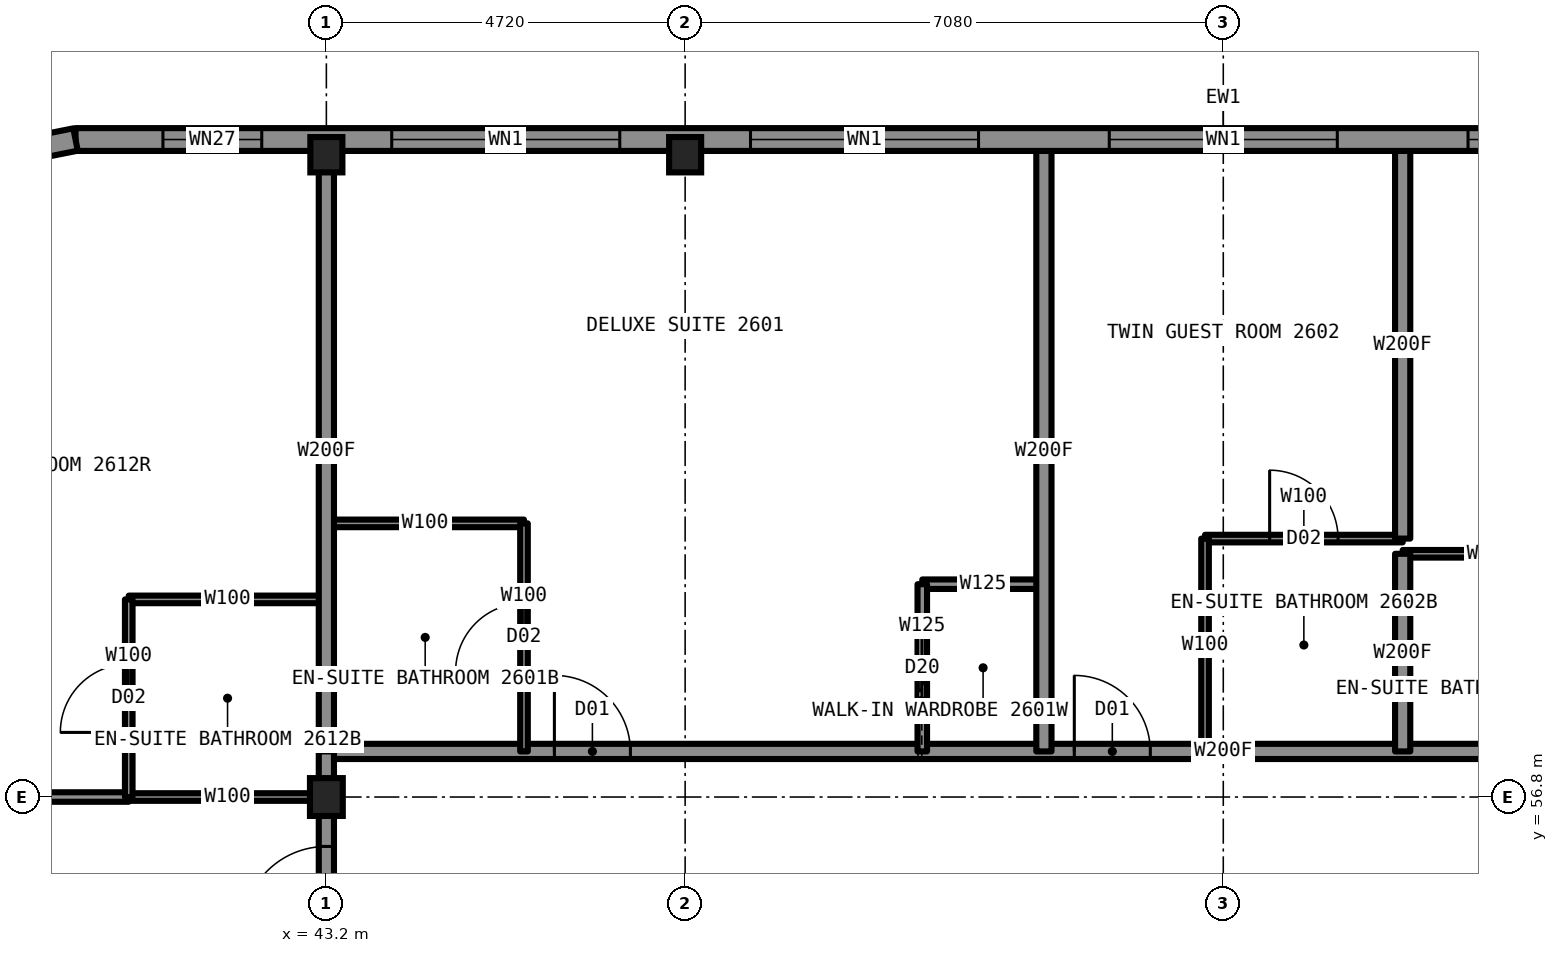
"""IFC4 building model, lengths in metres.
Left out: names, types, materials, properties, quantities, classifications, styles, units other than length and angle.
Written with IfcOpenShell. Run it as: python <this file> out.ifc"""

import sys

from ifc_helpers import new_model, si_unit, direction, frame, frame_2d, origin, origin_2d, place, context, subcontext, project, spatial, rectangle, i_section, extrude, element, fill, save


model = new_model("IFC4")
c1 = context("Model", 3, precision=1e-05, world=origin(), true_north=direction((0.0, 1.0)))
c2 = subcontext(c1, "Body", "Model", "MODEL_VIEW")
j1 = project(units=[si_unit("LENGTHUNIT", "METRE"), si_unit("PLANEANGLEUNIT", "RADIAN")], contexts=[c1])
p1 = place(None, origin())
s1 = spatial("IfcSite", under=j1, at=p1, CompositionType="ELEMENT")
p2 = place(p1, origin())
s2 = spatial("IfcBuilding", under=s1, at=p2, CompositionType="ELEMENT")
p3 = place(p2, frame((0.0, 0.0, 93.4)))
s3 = spatial("IfcBuildingStorey", under=s2, at=p3, CompositionType="ELEMENT", Elevation=93.4)
for number, where, z_axis, x_axis in (
    (1, (43.2, 65.25, 0.0), (0.0, 0.0, 1.0), (1.0, 0.0, 0.0)),
    (2, (47.92, 65.25, 0.0), (0.0, 0.0, 1.0), (1.0, 0.0, 0.0)),
):
    element("IfcColumn", number, at=place(p3, frame(where, z_axis=z_axis, x_axis=x_axis)), inside=s3, PredefinedType="COLUMN", context=c2, shape_type="SweptSolid", body=[
        extrude(i_section(OverallWidth=0.442, OverallDepth=0.531, WebThickness=0.066, FlangeThickness=0.106, at=origin_2d()), origin(), (0.0, 0.0, 1.0), 3.5),
    ])
p4 = place(p3, frame((43.2, 56.8, 0.0), z_axis=(0.0, 0.0, 1.0), x_axis=(1.0, 0.0, 0.0)))
e3 = element("IfcColumn", 3, at=p4, inside=s3, PredefinedType="COLUMN", context=c2, shape_type="SweptSolid", body=[
    extrude(i_section(OverallWidth=0.432, OverallDepth=0.498, WebThickness=0.056, FlangeThickness=0.089, at=origin_2d()), origin(), (0.0, 0.0, 1.0), 3.5),
])
p5 = place(p3, frame((40.6, 56.8, 0.0), z_axis=(0.0, 0.0, 1.0), x_axis=(1.0, 0.0, 0.0)))
e4 = element("IfcWall", 4, at=p5, inside=s3, PredefinedType="PARTITIONING", context=c2, shape_type="SweptSolid", body=[
    extrude(rectangle(XDim=2.6, YDim=0.1, at=frame_2d((1.3, 0.0))), origin(), (0.0, 0.0, 1.0), 2.573),
])
p6 = place(p3, frame((34.7, 56.8, 0.0), z_axis=(0.0, 0.0, 1.0), x_axis=(1.0, 0.0, 0.0)))
e5 = element("IfcWall", 5, at=p6, inside=s3, PredefinedType="PARTITIONING", context=c2, shape_type="SweptSolid", body=[
    extrude(rectangle(XDim=5.9, YDim=0.125, at=frame_2d((2.95, 0.0))), origin(), (0.0, 0.0, 1.0), 2.573),
])
p7 = place(p6, frame((3.85, 0.0, 0.0)))
e6 = element("IfcOpeningElement", 6, at=p7, cuts=e5, PredefinedType="OPENING", context=c2, shape_type="SweptSolid", body=[
    extrude(rectangle(XDim=0.9, YDim=2.2, at=frame_2d((0.45, 1.1))), frame((0.0, 0.073, 0.0), z_axis=(0.0, -1.0, 0.0), x_axis=(1.0, 0.0, 0.0)), (0.0, 0.0, 1.0), 0.145),
])
p8 = place(p3, frame((43.2, 57.4, 0.0), z_axis=(0.0, 0.0, 1.0), x_axis=(1.0, 0.0, 0.0)))
e7 = element("IfcWall", 7, at=p8, inside=s3, PredefinedType="PARTITIONING", context=c2, shape_type="SweptSolid", body=[
    extrude(rectangle(XDim=23.6, YDim=0.2, at=frame_2d((11.8, 0.0))), origin(), (0.0, 0.0, 1.0), 3.33),
])
p9 = place(p8, frame((3.0, 0.0, 0.0)))
e8 = element("IfcOpeningElement", 8, at=p9, cuts=e7, PredefinedType="OPENING", context=c2, shape_type="SweptSolid", body=[
    extrude(rectangle(XDim=1.0, YDim=2.2, at=frame_2d((0.5, 1.1))), frame((0.0, 0.11, 0.0), z_axis=(0.0, -1.0, 0.0), x_axis=(1.0, 0.0, 0.0)), (0.0, 0.0, 1.0), 0.22),
])
p10 = place(p8, frame((9.84, 0.0, 0.0)))
e9 = element("IfcOpeningElement", 9, at=p10, cuts=e7, PredefinedType="OPENING", context=c2, shape_type="SweptSolid", body=[
    extrude(rectangle(XDim=1.0, YDim=2.2, at=frame_2d((0.5, 1.1))), frame((0.0, 0.11, 0.0), z_axis=(0.0, -1.0, 0.0), x_axis=(1.0, 0.0, 0.0)), (0.0, 0.0, 1.0), 0.22),
])
p11 = place(p8, frame((16.71, 0.0, 0.0)))
e10 = element("IfcOpeningElement", 10, at=p11, cuts=e7, PredefinedType="OPENING", context=c2, shape_type="SweptSolid", body=[
    extrude(rectangle(XDim=1.0, YDim=2.2, at=frame_2d((0.5, 1.1))), frame((0.0, 0.11, 0.0), z_axis=(0.0, -1.0, 0.0), x_axis=(1.0, 0.0, 0.0)), (0.0, 0.0, 1.0), 0.22),
])
p12 = place(p8, frame((19.28, 0.0, 0.0)))
e11 = element("IfcOpeningElement", 11, at=p12, cuts=e7, PredefinedType="OPENING", context=c2, shape_type="SweptSolid", body=[
    extrude(rectangle(XDim=1.0, YDim=2.2, at=frame_2d((0.5, 1.1))), frame((0.0, 0.11, 0.0), z_axis=(0.0, -1.0, 0.0), x_axis=(1.0, 0.0, 0.0)), (0.0, 0.0, 1.0), 0.22),
])
p13 = place(p3, frame((40.6, 59.4, 0.0), z_axis=(0.0, 0.0, 1.0), x_axis=(1.0, 0.0, 0.0)))
e12 = element("IfcWall", 12, at=p13, inside=s3, PredefinedType="PARTITIONING", context=c2, shape_type="SweptSolid", body=[
    extrude(rectangle(XDim=2.6, YDim=0.1, at=frame_2d((1.3, 0.0))), origin(), (0.0, 0.0, 1.0), 3.33),
])
p14 = place(p3, frame((51.04, 59.6, 0.0), z_axis=(0.0, 0.0, 1.0), x_axis=(1.0, 0.0, 0.0)))
e13 = element("IfcWall", 13, at=p14, inside=s3, PredefinedType="PARTITIONING", context=c2, shape_type="SweptSolid", body=[
    extrude(rectangle(XDim=1.6, YDim=0.125, at=frame_2d((0.8, 0.0))), origin(), (0.0, 0.0, 1.0), 3.33),
])
p15 = place(p3, frame((57.36, 60.0, 0.0), z_axis=(0.0, 0.0, 1.0), x_axis=(1.0, 0.0, 0.0)))
e14 = element("IfcWall", 14, at=p15, inside=s3, PredefinedType="PARTITIONING", context=c2, shape_type="SweptSolid", body=[
    extrude(rectangle(XDim=2.3, YDim=0.1, at=frame_2d((1.15, 0.0))), origin(), (0.0, 0.0, 1.0), 2.731),
])
p16 = place(p3, frame((54.76, 60.2, 0.0), z_axis=(0.0, 0.0, 1.0), x_axis=(1.0, 0.0, 0.0)))
e15 = element("IfcWall", 15, at=p16, inside=s3, PredefinedType="PARTITIONING", context=c2, shape_type="SweptSolid", body=[
    extrude(rectangle(XDim=2.6, YDim=0.1, at=frame_2d((1.3, 0.0))), origin(), (0.0, 0.0, 1.0), 2.731),
])
p17 = place(p16, frame((0.85, 0.0, 0.0)))
e16 = element("IfcOpeningElement", 16, at=p17, cuts=e15, PredefinedType="OPENING", context=c2, shape_type="SweptSolid", body=[
    extrude(rectangle(XDim=0.9, YDim=2.1, at=frame_2d((0.45, 1.05))), frame((0.0, 0.06, 0.0), z_axis=(0.0, -1.0, 0.0), x_axis=(1.0, 0.0, 0.0)), (0.0, 0.0, 1.0), 0.12),
])
p18 = place(p3, frame((43.2, 60.4, 0.0), z_axis=(0.0, 0.0, 1.0), x_axis=(1.0, 0.0, 0.0)))
e17 = element("IfcWall", 17, at=p18, inside=s3, PredefinedType="PARTITIONING", context=c2, shape_type="SweptSolid", body=[
    extrude(rectangle(XDim=2.6, YDim=0.1, at=frame_2d((1.3, 0.0))), origin(), (0.0, 0.0, 1.0), 3.33),
])
p19 = place(p3, frame((54.76, 57.4, 0.0), z_axis=(0.0, 0.0, 1.0), x_axis=(0.0, 1.0, 0.0)))
e18 = element("IfcWall", 18, at=p19, inside=s3, PredefinedType="PARTITIONING", context=c2, shape_type="SweptSolid", body=[
    extrude(rectangle(XDim=2.8, YDim=0.1, at=frame_2d((1.4, 0.0))), origin(), (0.0, 0.0, 1.0), 3.33),
])
p20 = place(p3, frame((43.2, 33.22, 0.0), z_axis=(0.0, 0.0, 1.0), x_axis=(0.0, 1.0, 0.0)))
e19 = element("IfcWall", 19, at=p20, inside=s3, PredefinedType="PARTITIONING", context=c2, shape_type="SweptSolid", body=[
    extrude(rectangle(XDim=23.56, YDim=0.2, at=frame_2d((11.78, 0.0))), origin(), (0.0, 0.0, 1.0), 3.33),
])
p21 = place(p20, frame((16.4, 0.0, 0.0)))
e20 = element("IfcOpeningElement", 20, at=p21, cuts=e19, PredefinedType="OPENING", context=c2, shape_type="SweptSolid", body=[
    extrude(rectangle(XDim=1.0, YDim=2.2, at=frame_2d((0.5, 1.1))), frame((0.0, 0.11, 0.0), z_axis=(0.0, -1.0, 0.0), x_axis=(1.0, 0.0, 0.0)), (0.0, 0.0, 1.0), 0.22),
])
p22 = place(p20, frame((21.83, 0.0, 0.0)))
e21 = element("IfcOpeningElement", 21, at=p22, cuts=e19, PredefinedType="OPENING", context=c2, shape_type="SweptSolid", body=[
    extrude(rectangle(XDim=1.1, YDim=2.2, at=frame_2d((0.55, 1.1))), frame((0.0, 0.11, 0.0), z_axis=(0.0, -1.0, 0.0), x_axis=(1.0, 0.0, 0.0)), (0.0, 0.0, 1.0), 0.22),
])
p23 = place(p20, frame((0.63, 0.0, 0.0)))
e22 = element("IfcOpeningElement", 22, at=p23, cuts=e19, PredefinedType="OPENING", context=c2, shape_type="SweptSolid", body=[
    extrude(rectangle(XDim=1.1, YDim=2.2, at=frame_2d((0.55, 1.1))), frame((0.0, 0.11, 0.0), z_axis=(0.0, -1.0, 0.0), x_axis=(1.0, 0.0, 0.0)), (0.0, 0.0, 1.0), 0.22),
])
p24 = place(p20, frame((7.45, 0.0, 0.0)))
e23 = element("IfcOpeningElement", 23, at=p24, cuts=e19, PredefinedType="OPENING", context=c2, shape_type="SweptSolid", body=[
    extrude(rectangle(XDim=2.0, YDim=2.4, at=frame_2d((1.0, 1.2))), frame((0.0, 0.11, 0.0), z_axis=(0.0, -1.0, 0.0), x_axis=(1.0, 0.0, 0.0)), (0.0, 0.0, 1.0), 0.22),
])
p25 = place(p20, frame((5.4, 0.0, 0.0)))
e24 = element("IfcOpeningElement", 24, at=p25, cuts=e19, PredefinedType="OPENING", context=c2, shape_type="SweptSolid", body=[
    extrude(rectangle(XDim=1.0, YDim=2.1, at=frame_2d((0.5, 1.05))), frame((0.0, 0.11, 0.0), z_axis=(0.0, -1.0, 0.0), x_axis=(1.0, 0.0, 0.0)), (0.0, 0.0, 1.0), 0.22),
])
p26 = place(p3, frame((43.2, 57.4, 0.0), z_axis=(0.0, 0.0, 1.0), x_axis=(0.0, 1.0, 0.0)))
e25 = element("IfcWall", 25, at=p26, inside=s3, PredefinedType="PARTITIONING", context=c2, shape_type="SweptSolid", body=[
    extrude(rectangle(XDim=7.9, YDim=0.2, at=frame_2d((3.95, 0.0))), origin(), (0.0, 0.0, 1.0), 2.573),
])
p27 = place(p3, frame((40.6, 56.8, 0.0), z_axis=(0.0, 0.0, 1.0), x_axis=(0.0, 1.0, 0.0)))
e26 = element("IfcWall", 26, at=p27, inside=s3, PredefinedType="PARTITIONING", context=c2, shape_type="SweptSolid", body=[
    extrude(rectangle(XDim=2.6, YDim=0.1, at=frame_2d((1.3, 0.0))), origin(), (0.0, 0.0, 1.0), 3.33),
])
p28 = place(p27, frame((0.85, 0.0, 0.0)))
e27 = element("IfcOpeningElement", 27, at=p28, cuts=e26, PredefinedType="OPENING", context=c2, shape_type="SweptSolid", body=[
    extrude(rectangle(XDim=0.9, YDim=2.1, at=frame_2d((0.45, 1.05))), frame((0.0, 0.06, 0.0), z_axis=(0.0, -1.0, 0.0), x_axis=(1.0, 0.0, 0.0)), (0.0, 0.0, 1.0), 0.12),
])
p29 = place(p3, frame((52.64, 57.4, 0.0), z_axis=(0.0, 0.0, 1.0), x_axis=(0.0, 1.0, 0.0)))
e28 = element("IfcWall", 28, at=p29, inside=s3, PredefinedType="PARTITIONING", context=c2, shape_type="SweptSolid", body=[
    extrude(rectangle(XDim=7.9, YDim=0.2, at=frame_2d((3.95, 0.0))), origin(), (0.0, 0.0, 1.0), 3.33),
])
p30 = place(p3, frame((51.04, 57.4, 0.0), z_axis=(0.0, 0.0, 1.0), x_axis=(0.0, 1.0, 0.0)))
e29 = element("IfcWall", 29, at=p30, inside=s3, PredefinedType="PARTITIONING", context=c2, shape_type="SweptSolid", body=[
    extrude(rectangle(XDim=2.2, YDim=0.125, at=frame_2d((1.1, 0.0))), origin(), (0.0, 0.0, 1.0), 3.33),
])
p31 = place(p30, frame((0.7, 0.0, 0.0)))
e30 = element("IfcOpeningElement", 30, at=p31, cuts=e29, PredefinedType="OPENING", context=c2, shape_type="SweptSolid", body=[
    extrude(rectangle(XDim=0.8, YDim=2.1, at=frame_2d((0.4, 1.05))), frame((0.0, 0.073, 0.0), z_axis=(0.0, -1.0, 0.0), x_axis=(1.0, 0.0, 0.0)), (0.0, 0.0, 1.0), 0.145),
])
p32 = place(p3, frame((45.8, 57.4, 0.0), z_axis=(0.0, 0.0, 1.0), x_axis=(0.0, 1.0, 0.0)))
e31 = element("IfcWall", 31, at=p32, inside=s3, PredefinedType="PARTITIONING", context=c2, shape_type="SweptSolid", body=[
    extrude(rectangle(XDim=3.0, YDim=0.1, at=frame_2d((1.5, 0.0))), origin(), (0.0, 0.0, 1.0), 3.33),
])
p33 = place(p32, frame((1.05, 0.0, 0.0)))
e32 = element("IfcOpeningElement", 32, at=p33, cuts=e31, PredefinedType="OPENING", context=c2, shape_type="SweptSolid", body=[
    extrude(rectangle(XDim=0.9, YDim=2.1, at=frame_2d((0.45, 1.05))), frame((0.0, 0.06, 0.0), z_axis=(0.0, -1.0, 0.0), x_axis=(1.0, 0.0, 0.0)), (0.0, 0.0, 1.0), 0.12),
])
p34 = place(p3, frame((57.36, 57.4, 0.0), z_axis=(0.0, 0.0, 1.0), x_axis=(0.0, 1.0, 0.0)))
e33 = element("IfcWall", 33, at=p34, inside=s3, PredefinedType="PARTITIONING", context=c2, shape_type="SweptSolid", body=[
    extrude(rectangle(XDim=2.6, YDim=0.2, at=frame_2d((1.3, 0.0))), origin(), (0.0, 0.0, 1.0), 3.33),
])
p35 = place(p3, frame((57.36, 60.2, 0.0), z_axis=(0.0, 0.0, 1.0), x_axis=(0.0, 1.0, 0.0)))
e34 = element("IfcWall", 34, at=p35, inside=s3, PredefinedType="PARTITIONING", context=c2, shape_type="SweptSolid", body=[
    extrude(rectangle(XDim=5.1, YDim=0.2, at=frame_2d((2.55, 0.0))), origin(), (0.0, 0.0, 1.0), 3.33),
])
p36 = place(p3, frame((70.1, 65.45, 0.0), z_axis=(0.0, 0.0, 1.0), x_axis=(-1.0, 0.0, 0.0)))
e35 = element("IfcWall", 35, at=p36, inside=s3, PredefinedType="SOLIDWALL", context=c2, shape_type="SweptSolid", body=[
    extrude(rectangle(XDim=30.2, YDim=0.3, at=frame_2d((15.1, 0.0))), origin(), (0.0, 0.0, 1.0), 2.83),
])
p37 = place(p36, frame((0.85, 0.0, 0.5)))
e36 = element("IfcOpeningElement", 36, at=p37, cuts=e35, PredefinedType="OPENING", context=c2, shape_type="SweptSolid", body=[
    extrude(rectangle(XDim=1.6, YDim=2.0, at=frame_2d((0.8, 1.0))), frame((0.0, 0.16, 0.0), z_axis=(0.0, -1.0, 0.0), x_axis=(1.0, 0.0, 0.0)), (0.0, 0.0, 1.0), 0.32),
])
p38 = place(p36, frame((4.16, 0.0, 0.5)))
e37 = element("IfcOpeningElement", 37, at=p38, cuts=e35, PredefinedType="OPENING", context=c2, shape_type="SweptSolid", body=[
    extrude(rectangle(XDim=3.0, YDim=2.0, at=frame_2d((1.5, 1.0))), frame((0.0, 0.16, 0.0), z_axis=(0.0, -1.0, 0.0), x_axis=(1.0, 0.0, 0.0)), (0.0, 0.0, 1.0), 0.32),
])
p39 = place(p36, frame((8.88, 0.0, 0.5)))
e38 = element("IfcOpeningElement", 38, at=p39, cuts=e35, PredefinedType="OPENING", context=c2, shape_type="SweptSolid", body=[
    extrude(rectangle(XDim=3.0, YDim=2.0, at=frame_2d((1.5, 1.0))), frame((0.0, 0.16, 0.0), z_axis=(0.0, -1.0, 0.0), x_axis=(1.0, 0.0, 0.0)), (0.0, 0.0, 1.0), 0.32),
])
p40 = place(p36, frame((13.6, 0.0, 0.5)))
e39 = element("IfcOpeningElement", 39, at=p40, cuts=e35, PredefinedType="OPENING", context=c2, shape_type="SweptSolid", body=[
    extrude(rectangle(XDim=3.0, YDim=2.0, at=frame_2d((1.5, 1.0))), frame((0.0, 0.16, 0.0), z_axis=(0.0, -1.0, 0.0), x_axis=(1.0, 0.0, 0.0)), (0.0, 0.0, 1.0), 0.32),
])
p41 = place(p36, frame((18.32, 0.0, 0.5)))
e40 = element("IfcOpeningElement", 40, at=p41, cuts=e35, PredefinedType="OPENING", context=c2, shape_type="SweptSolid", body=[
    extrude(rectangle(XDim=3.0, YDim=2.0, at=frame_2d((1.5, 1.0))), frame((0.0, 0.16, 0.0), z_axis=(0.0, -1.0, 0.0), x_axis=(1.0, 0.0, 0.0)), (0.0, 0.0, 1.0), 0.32),
])
p42 = place(p36, frame((23.04, 0.0, 0.5)))
e41 = element("IfcOpeningElement", 41, at=p42, cuts=e35, PredefinedType="OPENING", context=c2, shape_type="SweptSolid", body=[
    extrude(rectangle(XDim=3.0, YDim=2.0, at=frame_2d((1.5, 1.0))), frame((0.0, 0.16, 0.0), z_axis=(0.0, -1.0, 0.0), x_axis=(1.0, 0.0, 0.0)), (0.0, 0.0, 1.0), 0.32),
])
p43 = place(p36, frame((27.75, 0.0, 0.5)))
e42 = element("IfcOpeningElement", 42, at=p43, cuts=e35, PredefinedType="OPENING", context=c2, shape_type="SweptSolid", body=[
    extrude(rectangle(XDim=1.6, YDim=2.0, at=frame_2d((0.8, 1.0))), frame((0.0, 0.16, 0.0), z_axis=(0.0, -1.0, 0.0), x_axis=(1.0, 0.0, 0.0)), (0.0, 0.0, 1.0), 0.32),
])
p44 = place(p3, frame((39.9, 65.45, 0.0), z_axis=(0.0, 0.0, 1.0), x_axis=(-0.980787050784, -0.195081421501, 0.0)))
e43 = element("IfcWall", 43, at=p44, inside=s3, PredefinedType="SOLIDWALL", context=c2, shape_type="SweptSolid", body=[
    extrude(rectangle(XDim=2.087, YDim=0.3, at=frame_2d((1.044, 0.0))), origin(), (0.0, 0.0, 1.0), 3.33),
])
p45 = place(p44, frame((0.444, 0.0, 0.5)))
e44 = element("IfcOpeningElement", 44, at=p45, cuts=e43, PredefinedType="OPENING", context=c2, shape_type="SweptSolid", body=[
    extrude(rectangle(XDim=1.2, YDim=2.0, at=frame_2d((0.6, 1.0))), frame((0.0, 0.16, 0.0), z_axis=(0.0, -1.0, 0.0), x_axis=(1.0, 0.0, 0.0)), (0.0, 0.0, 1.0), 0.32),
])
p46 = place(p3, frame((43.2, 56.78, 0.0), z_axis=(0.0, 0.0, 1.0), x_axis=(0.0, 1.0, 0.0)))
e45 = element("IfcWall", 45, at=p46, inside=s3, PredefinedType="PARTITIONING", context=c2, shape_type="SweptSolid", body=[
    extrude(rectangle(XDim=0.62, YDim=0.2, at=frame_2d((0.31, 0.0))), origin(), (0.0, 0.0, 1.0), 2.573),
])
p47 = place(p9, origin())
e46 = element("IfcDoor", 46, at=p47, inside=s3, OperationType="SINGLE_SWING_LEFT", PredefinedType="DOOR", context=c2, shape_type="SweptSolid", body=[
    extrude(rectangle(XDim=1.0, YDim=2.2, at=frame_2d((0.5, 1.1))), frame((0.0, 0.025, 0.0), z_axis=(0.0, -1.0, 0.0), x_axis=(1.0, 0.0, 0.0)), (0.0, 0.0, 1.0), 0.05),
])
fill(e8, e46)
p48 = place(p33, origin())
e47 = element("IfcDoor", 47, at=p48, inside=s3, OperationType="SINGLE_SWING_RIGHT", PredefinedType="DOOR", context=c2, shape_type="SweptSolid", body=[
    extrude(rectangle(XDim=0.9, YDim=2.1, at=frame_2d((0.45, 1.05))), frame((0.0, 0.025, 0.0), z_axis=(0.0, -1.0, 0.0), x_axis=(1.0, 0.0, 0.0)), (0.0, 0.0, 1.0), 0.05),
])
fill(e32, e47)
p49 = place(p31, origin())
e48 = element("IfcDoor", 48, at=p49, inside=s3, OperationType="SLIDING_TO_LEFT", PredefinedType="DOOR", context=c2, shape_type="SweptSolid", body=[
    extrude(rectangle(XDim=0.8, YDim=2.1, at=frame_2d((0.4, 1.05))), frame((0.0, 0.025, 0.0), z_axis=(0.0, -1.0, 0.0), x_axis=(1.0, 0.0, 0.0)), (0.0, 0.0, 1.0), 0.05),
])
fill(e30, e48)
p50 = place(p10, origin())
e49 = element("IfcDoor", 49, at=p50, inside=s3, OperationType="SINGLE_SWING_LEFT", PredefinedType="DOOR", context=c2, shape_type="SweptSolid", body=[
    extrude(rectangle(XDim=1.0, YDim=2.2, at=frame_2d((0.5, 1.1))), frame((0.0, 0.025, 0.0), z_axis=(0.0, -1.0, 0.0), x_axis=(1.0, 0.0, 0.0)), (0.0, 0.0, 1.0), 0.05),
])
fill(e9, e49)
p51 = place(p17, origin())
e50 = element("IfcDoor", 50, at=p51, inside=s3, OperationType="SINGLE_SWING_RIGHT", PredefinedType="DOOR", context=c2, shape_type="SweptSolid", body=[
    extrude(rectangle(XDim=0.9, YDim=2.1, at=frame_2d((0.45, 1.05))), frame((0.0, 0.025, 0.0), z_axis=(0.0, -1.0, 0.0), x_axis=(1.0, 0.0, 0.0)), (0.0, 0.0, 1.0), 0.05),
])
fill(e16, e50)
p52 = place(p22, origin())
e51 = element("IfcDoor", 51, at=p52, inside=s3, OperationType="SINGLE_SWING_LEFT", PredefinedType="DOOR", context=c2, shape_type="SweptSolid", body=[
    extrude(rectangle(XDim=1.1, YDim=2.2, at=frame_2d((0.55, 1.1))), frame((0.0, 0.025, 0.0), z_axis=(0.0, -1.0, 0.0), x_axis=(1.0, 0.0, 0.0)), (0.0, 0.0, 1.0), 0.05),
])
fill(e21, e51)
p53 = place(p28, origin())
e52 = element("IfcDoor", 52, at=p53, inside=s3, OperationType="SINGLE_SWING_RIGHT", PredefinedType="DOOR", context=c2, shape_type="SweptSolid", body=[
    extrude(rectangle(XDim=0.9, YDim=2.1, at=frame_2d((0.45, 1.05))), frame((0.0, 0.025, 0.0), z_axis=(0.0, -1.0, 0.0), x_axis=(1.0, 0.0, 0.0)), (0.0, 0.0, 1.0), 0.05),
])
fill(e27, e52)
p54 = place(p39, origin())
e53 = element("IfcWindow", 53, at=p54, inside=s3, PartitioningType="SINGLE_PANEL", PredefinedType="WINDOW", context=c2, shape_type="SweptSolid", body=[
    extrude(rectangle(XDim=3.0, YDim=2.0, at=frame_2d((1.5, 1.0))), frame((0.0, 0.03, 0.0), z_axis=(0.0, -1.0, 0.0), x_axis=(1.0, 0.0, 0.0)), (0.0, 0.0, 1.0), 0.06),
])
fill(e38, e53)
p55 = place(p40, origin())
e54 = element("IfcWindow", 54, at=p55, inside=s3, PartitioningType="SINGLE_PANEL", PredefinedType="WINDOW", context=c2, shape_type="SweptSolid", body=[
    extrude(rectangle(XDim=3.0, YDim=2.0, at=frame_2d((1.5, 1.0))), frame((0.0, 0.03, 0.0), z_axis=(0.0, -1.0, 0.0), x_axis=(1.0, 0.0, 0.0)), (0.0, 0.0, 1.0), 0.06),
])
fill(e39, e54)
p56 = place(p41, origin())
e55 = element("IfcWindow", 55, at=p56, inside=s3, PartitioningType="SINGLE_PANEL", PredefinedType="WINDOW", context=c2, shape_type="SweptSolid", body=[
    extrude(rectangle(XDim=3.0, YDim=2.0, at=frame_2d((1.5, 1.0))), frame((0.0, 0.03, 0.0), z_axis=(0.0, -1.0, 0.0), x_axis=(1.0, 0.0, 0.0)), (0.0, 0.0, 1.0), 0.06),
])
fill(e40, e55)
p57 = place(p42, origin())
e56 = element("IfcWindow", 56, at=p57, inside=s3, PartitioningType="SINGLE_PANEL", PredefinedType="WINDOW", context=c2, shape_type="SweptSolid", body=[
    extrude(rectangle(XDim=3.0, YDim=2.0, at=frame_2d((1.5, 1.0))), frame((0.0, 0.03, 0.0), z_axis=(0.0, -1.0, 0.0), x_axis=(1.0, 0.0, 0.0)), (0.0, 0.0, 1.0), 0.06),
])
fill(e41, e56)
p58 = place(p43, origin())
e57 = element("IfcWindow", 57, at=p58, inside=s3, PartitioningType="SINGLE_PANEL", PredefinedType="WINDOW", context=c2, shape_type="SweptSolid", body=[
    extrude(rectangle(XDim=1.6, YDim=2.0, at=frame_2d((0.8, 1.0))), frame((0.0, 0.03, 0.0), z_axis=(0.0, -1.0, 0.0), x_axis=(1.0, 0.0, 0.0)), (0.0, 0.0, 1.0), 0.06),
])
fill(e42, e57)
save(model, sys.argv[1])
